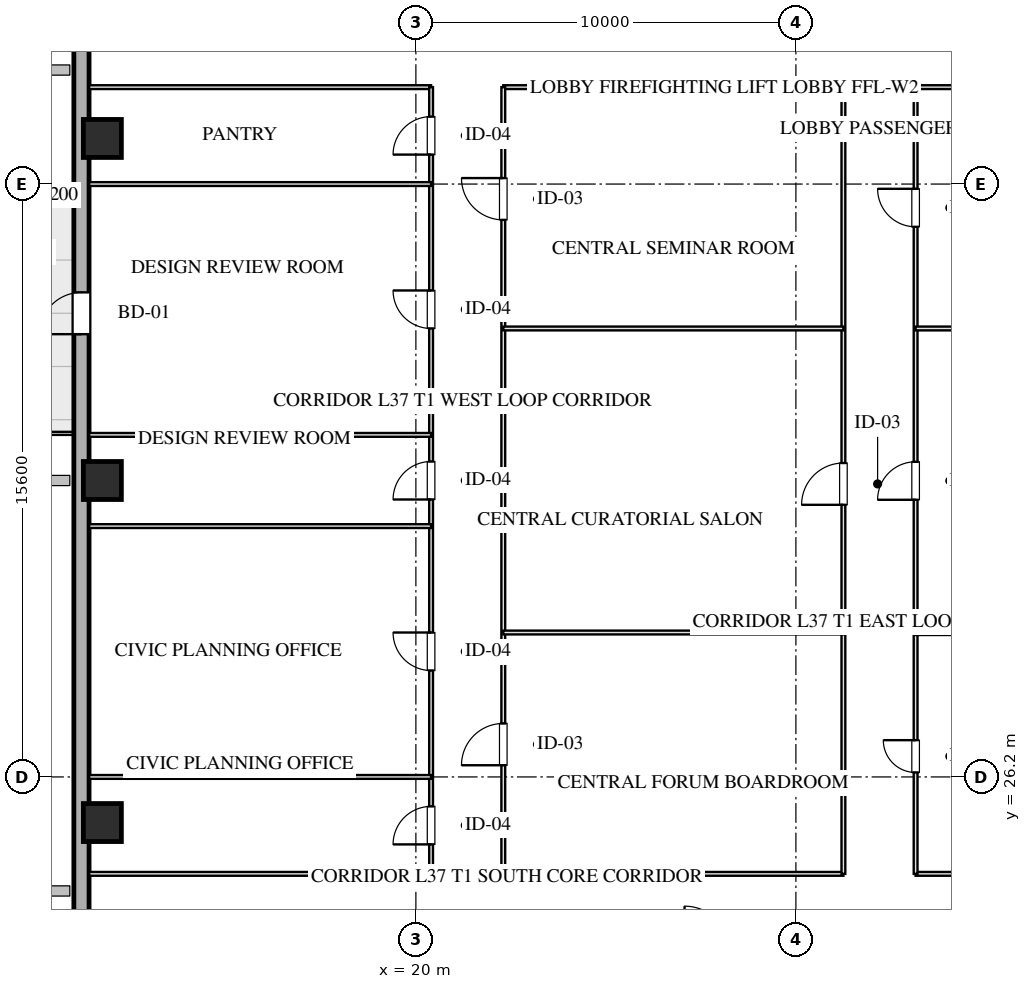
"""IFC4 building model, lengths in metres.
Left out: names, types, materials, properties, quantities, classifications, styles, units other than length and angle.
Written with IfcOpenShell. Run it as: python <this file> out.ifc"""

import sys

from ifc_helpers import new_model, si_unit, direction, frame, frame_2d, origin, origin_2d, place, context, subcontext, project, spatial, rectangle, hollow_rectangle, extrude, element, fill, save


model = new_model("IFC4")
c1 = context("Model", 3, precision=1e-05, world=origin(), true_north=direction((0.0, 1.0)))
c2 = subcontext(c1, "Body", "Model", "MODEL_VIEW")
j1 = project(units=[si_unit("LENGTHUNIT", "METRE"), si_unit("PLANEANGLEUNIT", "RADIAN")], contexts=[c1])
p1 = place(None, origin())
s1 = spatial("IfcSite", under=j1, at=p1, CompositionType="ELEMENT")
p2 = place(p1, origin())
s2 = spatial("IfcBuilding", under=s1, at=p2, CompositionType="ELEMENT")
p3 = place(p2, frame((0.0, 0.0, 142.6)))
s3 = spatial("IfcBuildingStorey", under=s2, at=p3, CompositionType="ELEMENT", Elevation=142.6)
for number, where, z_axis, x_axis in (
    (1, (11.75, 25.0, 0.0), (0.0, 0.0, 1.0), (1.0, 0.0, 0.0)),
    (2, (11.75, 34.0, 0.0), (0.0, 0.0, 1.0), (1.0, 0.0, 0.0)),
    (3, (11.75, 43.0, 0.0), (0.0, 0.0, 1.0), (1.0, 0.0, 0.0)),
):
    element("IfcColumn", number, at=place(p3, frame(where, z_axis=z_axis, x_axis=x_axis)), inside=s3, PredefinedType="COLUMN", context=c2, shape_type="SweptSolid", body=[
        extrude(hollow_rectangle(XDim=1.0, YDim=1.0, WallThickness=0.036, at=origin_2d()), origin(), (0.0, 0.0, 1.0), 3.451),
    ])
p4 = place(p3, frame((11.2, 9.0, 0.0), z_axis=(0.0, 0.0, 1.0), x_axis=(0.0, 1.0, 0.0)))
e4 = element("IfcWall", 4, at=p4, inside=s3, PredefinedType="SOLIDWALL", context=c2, shape_type="SweptSolid", body=[
    extrude(rectangle(XDim=50.0, YDim=0.4, at=frame_2d((25.0, 0.0))), origin(), (0.0, 0.0, 1.0), 2.61),
])
p5 = place(p4, frame((28.85, 0.0, 0.0)))
e5 = element("IfcOpeningElement", 5, at=p5, cuts=e4, PredefinedType="OPENING", context=c2, shape_type="SweptSolid", body=[
    extrude(rectangle(XDim=1.1, YDim=2.15, at=frame_2d((0.55, 1.075))), frame((0.0, 0.21, 0.0), z_axis=(0.0, -1.0, 0.0), x_axis=(1.0, 0.0, 0.0)), (0.0, 0.0, 1.0), 0.42),
])
p6 = place(p3, frame((11.4, 23.65, 0.0), z_axis=(0.0, 0.0, 1.0), x_axis=(1.0, 0.0, 0.0)))
e6 = element("IfcWall", 6, at=p6, inside=s3, PredefinedType="MOVABLE", context=c2, shape_type="SweptSolid", body=[
    extrude(rectangle(XDim=9.0, YDim=0.1, at=frame_2d((4.5, 0.0))), origin(), (0.0, 0.0, 1.0), 3.175),
])
p7 = place(p3, frame((22.3, 23.65, 0.0), z_axis=(0.0, 0.0, 1.0), x_axis=(1.0, 0.0, 0.0)))
e7 = element("IfcWall", 7, at=p7, inside=s3, PredefinedType="MOVABLE", context=c2, shape_type="SweptSolid", body=[
    extrude(rectangle(XDim=8.95, YDim=0.1, at=frame_2d((4.475, 0.0))), origin(), (0.0, 0.0, 1.0), 3.175),
])
p8 = place(p3, frame((33.15, 23.65, 0.0), z_axis=(0.0, 0.0, 1.0), x_axis=(1.0, 0.0, 0.0)))
e8 = element("IfcWall", 8, at=p8, inside=s3, PredefinedType="MOVABLE", context=c2, shape_type="SweptSolid", body=[
    extrude(rectangle(XDim=15.45, YDim=0.1, at=frame_2d((7.725, 0.0))), origin(), (0.0, 0.0, 1.0), 3.175),
])
p9 = place(p3, frame((11.4, 44.35, 0.0), z_axis=(0.0, 0.0, 1.0), x_axis=(1.0, 0.0, 0.0)))
e9 = element("IfcWall", 9, at=p9, inside=s3, PredefinedType="MOVABLE", context=c2, shape_type="SweptSolid", body=[
    extrude(rectangle(XDim=9.0, YDim=0.1, at=frame_2d((4.5, 0.0))), origin(), (0.0, 0.0, 1.0), 3.175),
])
p10 = place(p3, frame((22.3, 44.35, 0.0), z_axis=(0.0, 0.0, 1.0), x_axis=(1.0, 0.0, 0.0)))
e10 = element("IfcWall", 10, at=p10, inside=s3, PredefinedType="MOVABLE", context=c2, shape_type="SweptSolid", body=[
    extrude(rectangle(XDim=8.95, YDim=0.1, at=frame_2d((4.475, 0.0))), origin(), (0.0, 0.0, 1.0), 3.175),
])
p11 = place(p3, frame((33.15, 44.35, 0.0), z_axis=(0.0, 0.0, 1.0), x_axis=(1.0, 0.0, 0.0)))
e11 = element("IfcWall", 11, at=p11, inside=s3, PredefinedType="MOVABLE", context=c2, shape_type="SweptSolid", body=[
    extrude(rectangle(XDim=15.45, YDim=0.1, at=frame_2d((7.725, 0.0))), origin(), (0.0, 0.0, 1.0), 3.175),
])
p12 = place(p3, frame((20.4, 23.65, 0.0), z_axis=(0.0, 0.0, 1.0), x_axis=(0.0, 1.0, 0.0)))
e12 = element("IfcWall", 12, at=p12, inside=s3, PredefinedType="MOVABLE", context=c2, shape_type="SweptSolid", body=[
    extrude(rectangle(XDim=20.7, YDim=0.1, at=frame_2d((10.35, 0.0))), origin(), (0.0, 0.0, 1.0), 3.175),
])
p13 = place(p12, frame((0.775, 0.0, 0.0)))
e13 = element("IfcOpeningElement", 13, at=p13, cuts=e12, PredefinedType="OPENING", context=c2, shape_type="SweptSolid", body=[
    extrude(rectangle(XDim=1.0, YDim=2.05, at=frame_2d((0.5, 1.025))), frame((0.0, 0.06, 0.0), z_axis=(0.0, -1.0, 0.0), x_axis=(1.0, 0.0, 0.0)), (0.0, 0.0, 1.0), 0.12),
])
p14 = place(p12, frame((5.35, 0.0, 0.0)))
e14 = element("IfcOpeningElement", 14, at=p14, cuts=e12, PredefinedType="OPENING", context=c2, shape_type="SweptSolid", body=[
    extrude(rectangle(XDim=1.0, YDim=2.05, at=frame_2d((0.5, 1.025))), frame((0.0, 0.06, 0.0), z_axis=(0.0, -1.0, 0.0), x_axis=(1.0, 0.0, 0.0)), (0.0, 0.0, 1.0), 0.12),
])
p15 = place(p12, frame((9.85, 0.0, 0.0)))
e15 = element("IfcOpeningElement", 15, at=p15, cuts=e12, PredefinedType="OPENING", context=c2, shape_type="SweptSolid", body=[
    extrude(rectangle(XDim=1.0, YDim=2.05, at=frame_2d((0.5, 1.025))), frame((0.0, 0.06, 0.0), z_axis=(0.0, -1.0, 0.0), x_axis=(1.0, 0.0, 0.0)), (0.0, 0.0, 1.0), 0.12),
])
p16 = place(p12, frame((14.35, 0.0, 0.0)))
e16 = element("IfcOpeningElement", 16, at=p16, cuts=e12, PredefinedType="OPENING", context=c2, shape_type="SweptSolid", body=[
    extrude(rectangle(XDim=1.0, YDim=2.05, at=frame_2d((0.5, 1.025))), frame((0.0, 0.06, 0.0), z_axis=(0.0, -1.0, 0.0), x_axis=(1.0, 0.0, 0.0)), (0.0, 0.0, 1.0), 0.12),
])
p17 = place(p12, frame((18.925, 0.0, 0.0)))
e17 = element("IfcOpeningElement", 17, at=p17, cuts=e12, PredefinedType="OPENING", context=c2, shape_type="SweptSolid", body=[
    extrude(rectangle(XDim=1.0, YDim=2.05, at=frame_2d((0.5, 1.025))), frame((0.0, 0.06, 0.0), z_axis=(0.0, -1.0, 0.0), x_axis=(1.0, 0.0, 0.0)), (0.0, 0.0, 1.0), 0.12),
])
p18 = place(p3, frame((22.3, 23.65, 0.0), z_axis=(0.0, 0.0, 1.0), x_axis=(0.0, 1.0, 0.0)))
e18 = element("IfcWall", 18, at=p18, inside=s3, PredefinedType="MOVABLE", context=c2, shape_type="SweptSolid", body=[
    extrude(rectangle(XDim=20.7, YDim=0.1, at=frame_2d((10.35, 0.0))), origin(), (0.0, 0.0, 1.0), 3.175),
])
p19 = place(p18, frame((2.857, 0.0, 0.0)))
e19 = element("IfcOpeningElement", 19, at=p19, cuts=e18, PredefinedType="OPENING", context=c2, shape_type="SweptSolid", body=[
    extrude(rectangle(XDim=1.1, YDim=2.05, at=frame_2d((0.55, 1.025))), frame((0.0, 0.06, 0.0), z_axis=(0.0, -1.0, 0.0), x_axis=(1.0, 0.0, 0.0)), (0.0, 0.0, 1.0), 0.12),
])
p20 = place(p18, frame((17.208, 0.0, 0.0)))
e20 = element("IfcOpeningElement", 20, at=p20, cuts=e18, PredefinedType="OPENING", context=c2, shape_type="SweptSolid", body=[
    extrude(rectangle(XDim=1.1, YDim=2.05, at=frame_2d((0.55, 1.025))), frame((0.0, 0.06, 0.0), z_axis=(0.0, -1.0, 0.0), x_axis=(1.0, 0.0, 0.0)), (0.0, 0.0, 1.0), 0.12),
])
p21 = place(p3, frame((31.25, 23.65, 0.0), z_axis=(0.0, 0.0, 1.0), x_axis=(0.0, 1.0, 0.0)))
e21 = element("IfcWall", 21, at=p21, inside=s3, PredefinedType="MOVABLE", context=c2, shape_type="SweptSolid", body=[
    extrude(rectangle(XDim=20.7, YDim=0.1, at=frame_2d((10.35, 0.0))), origin(), (0.0, 0.0, 1.0), 3.175),
])
p22 = place(p21, frame((9.71, 0.0, 0.0)))
e22 = element("IfcOpeningElement", 22, at=p22, cuts=e21, PredefinedType="OPENING", context=c2, shape_type="SweptSolid", body=[
    extrude(rectangle(XDim=1.1, YDim=2.05, at=frame_2d((0.55, 1.025))), frame((0.0, 0.06, 0.0), z_axis=(0.0, -1.0, 0.0), x_axis=(1.0, 0.0, 0.0)), (0.0, 0.0, 1.0), 0.12),
])
p23 = place(p3, frame((33.15, 23.65, 0.0), z_axis=(0.0, 0.0, 1.0), x_axis=(0.0, 1.0, 0.0)))
e23 = element("IfcWall", 23, at=p23, inside=s3, PredefinedType="MOVABLE", context=c2, shape_type="SweptSolid", body=[
    extrude(rectangle(XDim=20.7, YDim=0.1, at=frame_2d((10.35, 0.0))), origin(), (0.0, 0.0, 1.0), 3.175),
])
p24 = place(p23, frame((2.667, 0.0, 0.0)))
e24 = element("IfcOpeningElement", 24, at=p24, cuts=e23, PredefinedType="OPENING", context=c2, shape_type="SweptSolid", body=[
    extrude(rectangle(XDim=0.85, YDim=2.05, at=frame_2d((0.425, 1.025))), frame((0.0, 0.06, 0.0), z_axis=(0.0, -1.0, 0.0), x_axis=(1.0, 0.0, 0.0)), (0.0, 0.0, 1.0), 0.12),
])
p25 = place(p23, frame((9.843, 0.0, 0.0)))
e25 = element("IfcOpeningElement", 25, at=p25, cuts=e23, PredefinedType="OPENING", context=c2, shape_type="SweptSolid", body=[
    extrude(rectangle(XDim=1.0, YDim=2.05, at=frame_2d((0.5, 1.025))), frame((0.0, 0.06, 0.0), z_axis=(0.0, -1.0, 0.0), x_axis=(1.0, 0.0, 0.0)), (0.0, 0.0, 1.0), 0.12),
])
p26 = place(p23, frame((17.025, 0.0, 0.0)))
e26 = element("IfcOpeningElement", 26, at=p26, cuts=e23, PredefinedType="OPENING", context=c2, shape_type="SweptSolid", body=[
    extrude(rectangle(XDim=1.0, YDim=2.05, at=frame_2d((0.5, 1.025))), frame((0.0, 0.06, 0.0), z_axis=(0.0, -1.0, 0.0), x_axis=(1.0, 0.0, 0.0)), (0.0, 0.0, 1.0), 0.12),
])
for number, where, z_axis, x_axis in (
    (27, (22.3, 30.0, 0.0), (0.0, 0.0, 1.0), (1.0, 0.0, 0.0)),
    (28, (22.3, 38.0, 0.0), (0.0, 0.0, 1.0), (1.0, 0.0, 0.0)),
):
    element("IfcWall", number, at=place(p3, frame(where, z_axis=z_axis, x_axis=x_axis)), inside=s3, PredefinedType="MOVABLE", context=c2, shape_type="SweptSolid", body=[
        extrude(rectangle(XDim=8.95, YDim=0.1, at=frame_2d((4.475, 0.0))), origin(), (0.0, 0.0, 1.0), 3.175),
    ])
for number, where, z_axis, x_axis in (
    (29, (11.4, 26.2, 0.0), (0.0, 0.0, 1.0), (1.0, 0.0, 0.0)),
    (30, (11.4, 32.8, 0.0), (0.0, 0.0, 1.0), (1.0, 0.0, 0.0)),
    (31, (11.4, 35.2, 0.0), (0.0, 0.0, 1.0), (1.0, 0.0, 0.0)),
    (32, (11.4, 41.8, 0.0), (0.0, 0.0, 1.0), (1.0, 0.0, 0.0)),
):
    element("IfcWall", number, at=place(p3, frame(where, z_axis=z_axis, x_axis=x_axis)), inside=s3, PredefinedType="MOVABLE", context=c2, shape_type="SweptSolid", body=[
        extrude(rectangle(XDim=9.0, YDim=0.1, at=frame_2d((4.5, 0.0))), origin(), (0.0, 0.0, 1.0), 3.175),
    ])
for number, where, z_axis, x_axis in (
    (33, (33.15, 29.985, 0.0), (0.0, 0.0, 1.0), (1.0, 0.0, 0.0)),
    (34, (33.15, 38.0, 0.0), (0.0, 0.0, 1.0), (1.0, 0.0, 0.0)),
):
    element("IfcWall", number, at=place(p3, frame(where, z_axis=z_axis, x_axis=x_axis)), inside=s3, PredefinedType="MOVABLE", context=c2, shape_type="SweptSolid", body=[
        extrude(rectangle(XDim=15.45, YDim=0.1, at=frame_2d((7.725, 0.0))), origin(), (0.0, 0.0, 1.0), 3.175),
    ])
p27 = place(p5, origin())
e35 = element("IfcDoor", 35, at=p27, inside=s3, OperationType="SINGLE_SWING_LEFT", PredefinedType="DOOR", context=c2, shape_type="SweptSolid", body=[
    extrude(rectangle(XDim=1.1, YDim=2.15, at=frame_2d((0.55, 1.075))), frame((0.0, 0.025, 0.0), z_axis=(0.0, -1.0, 0.0), x_axis=(1.0, 0.0, 0.0)), (0.0, 0.0, 1.0), 0.05),
])
fill(e5, e35)
p28 = place(p13, origin())
e36 = element("IfcDoor", 36, at=p28, inside=s3, OperationType="SINGLE_SWING_LEFT", PredefinedType="DOOR", context=c2, shape_type="SweptSolid", body=[
    extrude(rectangle(XDim=1.0, YDim=2.05, at=frame_2d((0.5, 1.025))), frame((0.0, 0.025, 0.0), z_axis=(0.0, -1.0, 0.0), x_axis=(1.0, 0.0, 0.0)), (0.0, 0.0, 1.0), 0.05),
])
fill(e13, e36)
p29 = place(p14, origin())
e37 = element("IfcDoor", 37, at=p29, inside=s3, OperationType="SINGLE_SWING_RIGHT", PredefinedType="DOOR", context=c2, shape_type="SweptSolid", body=[
    extrude(rectangle(XDim=1.0, YDim=2.05, at=frame_2d((0.5, 1.025))), frame((0.0, 0.025, 0.0), z_axis=(0.0, -1.0, 0.0), x_axis=(1.0, 0.0, 0.0)), (0.0, 0.0, 1.0), 0.05),
])
fill(e14, e37)
p30 = place(p15, origin())
e38 = element("IfcDoor", 38, at=p30, inside=s3, OperationType="SINGLE_SWING_LEFT", PredefinedType="DOOR", context=c2, shape_type="SweptSolid", body=[
    extrude(rectangle(XDim=1.0, YDim=2.05, at=frame_2d((0.5, 1.025))), frame((0.0, 0.025, 0.0), z_axis=(0.0, -1.0, 0.0), x_axis=(1.0, 0.0, 0.0)), (0.0, 0.0, 1.0), 0.05),
])
fill(e15, e38)
p31 = place(p16, origin())
e39 = element("IfcDoor", 39, at=p31, inside=s3, OperationType="SINGLE_SWING_RIGHT", PredefinedType="DOOR", context=c2, shape_type="SweptSolid", body=[
    extrude(rectangle(XDim=1.0, YDim=2.05, at=frame_2d((0.5, 1.025))), frame((0.0, 0.025, 0.0), z_axis=(0.0, -1.0, 0.0), x_axis=(1.0, 0.0, 0.0)), (0.0, 0.0, 1.0), 0.05),
])
fill(e16, e39)
p32 = place(p17, origin())
e40 = element("IfcDoor", 40, at=p32, inside=s3, OperationType="SINGLE_SWING_LEFT", PredefinedType="DOOR", context=c2, shape_type="SweptSolid", body=[
    extrude(rectangle(XDim=1.0, YDim=2.05, at=frame_2d((0.5, 1.025))), frame((0.0, 0.025, 0.0), z_axis=(0.0, -1.0, 0.0), x_axis=(1.0, 0.0, 0.0)), (0.0, 0.0, 1.0), 0.05),
])
fill(e17, e40)
p33 = place(p19, origin())
e41 = element("IfcDoor", 41, at=p33, inside=s3, OperationType="SINGLE_SWING_LEFT", PredefinedType="DOOR", context=c2, shape_type="SweptSolid", body=[
    extrude(rectangle(XDim=1.1, YDim=2.05, at=frame_2d((0.55, 1.025))), frame((0.0, 0.025, 0.0), z_axis=(0.0, -1.0, 0.0), x_axis=(1.0, 0.0, 0.0)), (0.0, 0.0, 1.0), 0.05),
])
fill(e19, e41)
p34 = place(p20, origin())
e42 = element("IfcDoor", 42, at=p34, inside=s3, OperationType="SINGLE_SWING_RIGHT", PredefinedType="DOOR", context=c2, shape_type="SweptSolid", body=[
    extrude(rectangle(XDim=1.1, YDim=2.05, at=frame_2d((0.55, 1.025))), frame((0.0, 0.025, 0.0), z_axis=(0.0, -1.0, 0.0), x_axis=(1.0, 0.0, 0.0)), (0.0, 0.0, 1.0), 0.05),
])
fill(e20, e42)
p35 = place(p22, origin())
e43 = element("IfcDoor", 43, at=p35, inside=s3, OperationType="SINGLE_SWING_LEFT", PredefinedType="DOOR", context=c2, shape_type="SweptSolid", body=[
    extrude(rectangle(XDim=1.1, YDim=2.05, at=frame_2d((0.55, 1.025))), frame((0.0, 0.025, 0.0), z_axis=(0.0, -1.0, 0.0), x_axis=(1.0, 0.0, 0.0)), (0.0, 0.0, 1.0), 0.05),
])
fill(e22, e43)
p36 = place(p24, origin())
e44 = element("IfcDoor", 44, at=p36, inside=s3, OperationType="SINGLE_SWING_RIGHT", PredefinedType="DOOR", context=c2, shape_type="SweptSolid", body=[
    extrude(rectangle(XDim=0.85, YDim=2.05, at=frame_2d((0.425, 1.025))), frame((0.0, 0.025, 0.0), z_axis=(0.0, -1.0, 0.0), x_axis=(1.0, 0.0, 0.0)), (0.0, 0.0, 1.0), 0.05),
])
fill(e24, e44)
p37 = place(p25, origin())
e45 = element("IfcDoor", 45, at=p37, inside=s3, OperationType="SINGLE_SWING_LEFT", PredefinedType="DOOR", context=c2, shape_type="SweptSolid", body=[
    extrude(rectangle(XDim=1.0, YDim=2.05, at=frame_2d((0.5, 1.025))), frame((0.0, 0.025, 0.0), z_axis=(0.0, -1.0, 0.0), x_axis=(1.0, 0.0, 0.0)), (0.0, 0.0, 1.0), 0.05),
])
fill(e25, e45)
p38 = place(p26, origin())
e46 = element("IfcDoor", 46, at=p38, inside=s3, OperationType="SINGLE_SWING_RIGHT", PredefinedType="DOOR", context=c2, shape_type="SweptSolid", body=[
    extrude(rectangle(XDim=1.0, YDim=2.05, at=frame_2d((0.5, 1.025))), frame((0.0, 0.025, 0.0), z_axis=(0.0, -1.0, 0.0), x_axis=(1.0, 0.0, 0.0)), (0.0, 0.0, 1.0), 0.05),
])
fill(e26, e46)
save(model, sys.argv[1])
